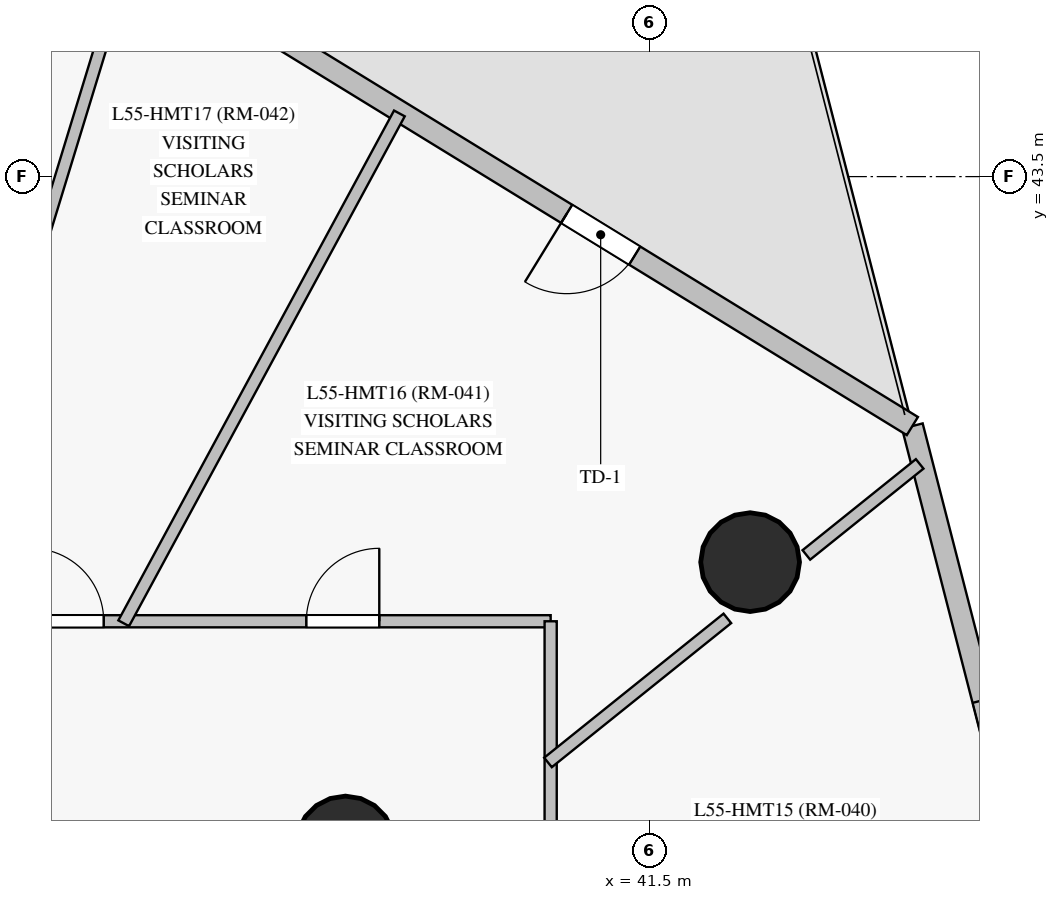
"""IFC4 building model, lengths in metres.
Left out: names, types, materials, properties, quantities, classifications, styles, units other than length and angle.
Written with IfcOpenShell. Run it as: python <this file> out.ifc"""

import sys

from ifc_helpers import new_model, si_unit, direction, frame, frame_2d, origin, origin_with_axes, origin_2d, place, context, subcontext, project, spatial, rectangle, circle, extrude, source, transform, mapped, element, fill, save


model = new_model("IFC4")
c1 = context("Model", 3, precision=1e-05, world=origin(), true_north=direction((0.0, 1.0)))
c2 = subcontext(c1, "Body", "Model", "MODEL_VIEW")
j1 = project(units=[si_unit("LENGTHUNIT", "METRE"), si_unit("PLANEANGLEUNIT", "RADIAN")], contexts=[c1])
p1 = place(None, origin())
s1 = spatial("IfcSite", under=j1, at=p1, CompositionType="ELEMENT")
p2 = place(p1, origin())
s2 = spatial("IfcBuilding", under=s1, at=p2, CompositionType="ELEMENT")
p3 = place(p2, frame((0.0, 0.0, 190.1)))
s3 = spatial("IfcBuildingStorey", under=s2, at=p3, CompositionType="ELEMENT", Elevation=190.1)
m1 = source(origin_with_axes(), c2, "Body", "SweptSolid", [
    extrude(circle(Radius=0.65, at=origin_2d()), origin(), (0.0, 0.0, 1.0), 3.05),
])
for number, where, z_axis, x_axis in (
    (1, (37.5, 34.7, 0.0), (0.0, 0.0, 1.0), (1.0, 0.0, 0.0)),
    (2, (42.824, 38.428, 0.0), (0.0, 0.0, 1.0), (1.0, 0.0, 0.0)),
):
    element("IfcColumn", number, at=place(p3, frame(where, z_axis=z_axis, x_axis=x_axis)), inside=s3, PredefinedType="COLUMN", context=c2, shape_type="MappedRepresentation", body=[
        mapped(m1, transform((0.0, 0.0, 0.0), scale=1.0)),
    ])
p4 = place(p3, frame((47.107, 31.861, 0.0), z_axis=(0.0, 0.0, 1.0), x_axis=(-0.249041039811, 0.968492932597, 0.0)))
e3 = element("IfcWall", 3, at=p4, inside=s3, PredefinedType="SOLIDWALL", context=c2, shape_type="SweptSolid", body=[
    extrude(rectangle(XDim=8.629, YDim=0.28, at=frame_2d((4.314, 0.0))), origin(), (0.0, 0.0, 1.0), 2.825),
])
p5 = place(p4, frame((3.154, 0.0, 0.85)))
e4 = element("IfcOpeningElement", 4, at=p5, cuts=e3, PredefinedType="OPENING", context=c2, shape_type="SweptSolid", body=[
    extrude(rectangle(XDim=1.75, YDim=1.65, at=frame_2d((0.875, 0.825))), frame((0.0, 0.15, 0.0), z_axis=(0.0, -1.0, 0.0), x_axis=(1.0, 0.0, 0.0)), (0.0, 0.0, 1.0), 0.3),
])
p6 = place(p3, frame((44.958, 40.218, 0.0), z_axis=(0.0, 0.0, 1.0), x_axis=(-0.852257947878, 0.523121773853, 0.0)))
e5 = element("IfcWall", 5, at=p6, inside=s3, PredefinedType="SOLIDWALL", context=c2, shape_type="SweptSolid", body=[
    extrude(rectangle(XDim=19.246, YDim=0.28, at=frame_2d((9.623, 0.0))), origin(), (0.0, 0.0, 1.0), 2.495),
])
p7 = place(p6, frame((4.287, 0.0, 0.0)))
e6 = element("IfcOpeningElement", 6, at=p7, cuts=e5, PredefinedType="OPENING", context=c2, shape_type="SweptSolid", body=[
    extrude(rectangle(XDim=1.05, YDim=2.12, at=frame_2d((0.525, 1.06))), frame((0.0, 0.15, 0.0), z_axis=(0.0, -1.0, 0.0), x_axis=(1.0, 0.0, 0.0)), (0.0, 0.0, 1.0), 0.3),
])
p8 = place(p3, frame((16.7, 37.65, 0.0), z_axis=(0.0, 0.0, 1.0), x_axis=(1.0, 0.0, 0.0)))
e7 = element("IfcWall", 7, at=p8, inside=s3, PredefinedType="PARTITIONING", context=c2, shape_type="SweptSolid", body=[
    extrude(rectangle(XDim=23.5, YDim=0.16, at=frame_2d((11.75, 0.0))), origin(), (0.0, 0.0, 1.0), 2.375),
])
p9 = place(p8, frame((20.285, 0.0, 0.0)))
e8 = element("IfcOpeningElement", 8, at=p9, cuts=e7, PredefinedType="OPENING", context=c2, shape_type="SweptSolid", body=[
    extrude(rectangle(XDim=0.96, YDim=2.15, at=frame_2d((0.48, 1.075))), frame((0.0, 0.09, 0.0), z_axis=(0.0, -1.0, 0.0), x_axis=(1.0, 0.0, 0.0)), (0.0, 0.0, 1.0), 0.18),
])
p10 = place(p8, frame((16.66, 0.0, 0.0)))
e9 = element("IfcOpeningElement", 9, at=p10, cuts=e7, PredefinedType="OPENING", context=c2, shape_type="SweptSolid", body=[
    extrude(rectangle(XDim=0.96, YDim=2.15, at=frame_2d((0.48, 1.075))), frame((0.0, 0.09, 0.0), z_axis=(0.0, -1.0, 0.0), x_axis=(1.0, 0.0, 0.0)), (0.0, 0.0, 1.0), 0.18),
])
p11 = place(p8, frame((13.863, 0.0, 0.0)))
e10 = element("IfcOpeningElement", 10, at=p11, cuts=e7, PredefinedType="OPENING", context=c2, shape_type="SweptSolid", body=[
    extrude(rectangle(XDim=0.96, YDim=2.15, at=frame_2d((0.48, 1.075))), frame((0.0, 0.09, 0.0), z_axis=(0.0, -1.0, 0.0), x_axis=(1.0, 0.0, 0.0)), (0.0, 0.0, 1.0), 0.18),
])
p12 = place(p8, frame((11.965, 0.0, 0.0)))
e11 = element("IfcOpeningElement", 11, at=p12, cuts=e7, PredefinedType="OPENING", context=c2, shape_type="SweptSolid", body=[
    extrude(rectangle(XDim=0.96, YDim=2.15, at=frame_2d((0.48, 1.075))), frame((0.0, 0.09, 0.0), z_axis=(0.0, -1.0, 0.0), x_axis=(1.0, 0.0, 0.0)), (0.0, 0.0, 1.0), 0.18),
])
p13 = place(p8, frame((10.215, 0.0, 0.0)))
e12 = element("IfcOpeningElement", 12, at=p13, cuts=e7, PredefinedType="OPENING", context=c2, shape_type="SweptSolid", body=[
    extrude(rectangle(XDim=0.96, YDim=2.15, at=frame_2d((0.48, 1.075))), frame((0.0, 0.09, 0.0), z_axis=(0.0, -1.0, 0.0), x_axis=(1.0, 0.0, 0.0)), (0.0, 0.0, 1.0), 0.18),
])
p14 = place(p8, frame((8.14, 0.0, 0.0)))
e13 = element("IfcOpeningElement", 13, at=p14, cuts=e7, PredefinedType="OPENING", context=c2, shape_type="SweptSolid", body=[
    extrude(rectangle(XDim=0.96, YDim=2.15, at=frame_2d((0.48, 1.075))), frame((0.0, 0.09, 0.0), z_axis=(0.0, -1.0, 0.0), x_axis=(1.0, 0.0, 0.0)), (0.0, 0.0, 1.0), 0.18),
])
p15 = place(p8, frame((5.54, 0.0, 0.0)))
e14 = element("IfcOpeningElement", 14, at=p15, cuts=e7, PredefinedType="OPENING", context=c2, shape_type="SweptSolid", body=[
    extrude(rectangle(XDim=0.96, YDim=2.15, at=frame_2d((0.48, 1.075))), frame((0.0, 0.09, 0.0), z_axis=(0.0, -1.0, 0.0), x_axis=(1.0, 0.0, 0.0)), (0.0, 0.0, 1.0), 0.18),
])
p16 = place(p8, frame((3.377, 0.0, 0.0)))
e15 = element("IfcOpeningElement", 15, at=p16, cuts=e7, PredefinedType="OPENING", context=c2, shape_type="SweptSolid", body=[
    extrude(rectangle(XDim=0.96, YDim=2.15, at=frame_2d((0.48, 1.075))), frame((0.0, 0.09, 0.0), z_axis=(0.0, -1.0, 0.0), x_axis=(1.0, 0.0, 0.0)), (0.0, 0.0, 1.0), 0.18),
])
p17 = place(p3, frame((40.2, 37.65, 0.0), z_axis=(0.0, 0.0, 1.0), x_axis=(0.0, -1.0, 0.0)))
e16 = element("IfcWall", 16, at=p17, inside=s3, PredefinedType="PARTITIONING", context=c2, shape_type="SweptSolid", body=[
    extrude(rectangle(XDim=22.3, YDim=0.16, at=frame_2d((11.15, 0.0))), origin(), (0.0, 0.0, 1.0), 2.375),
])
p18 = place(p17, frame((19.455, 0.0, 0.0)))
e17 = element("IfcOpeningElement", 17, at=p18, cuts=e16, PredefinedType="OPENING", context=c2, shape_type="SweptSolid", body=[
    extrude(rectangle(XDim=0.96, YDim=2.15, at=frame_2d((0.48, 1.075))), frame((0.0, 0.09, 0.0), z_axis=(0.0, -1.0, 0.0), x_axis=(1.0, 0.0, 0.0)), (0.0, 0.0, 1.0), 0.18),
])
p19 = place(p17, frame((11.265, 0.0, 0.0)))
e18 = element("IfcOpeningElement", 18, at=p19, cuts=e16, PredefinedType="OPENING", context=c2, shape_type="SweptSolid", body=[
    extrude(rectangle(XDim=0.96, YDim=2.15, at=frame_2d((0.48, 1.075))), frame((0.0, 0.09, 0.0), z_axis=(0.0, -1.0, 0.0), x_axis=(1.0, 0.0, 0.0)), (0.0, 0.0, 1.0), 0.18),
])
p20 = place(p17, frame((7.33, 0.0, 0.0)))
e19 = element("IfcOpeningElement", 19, at=p20, cuts=e16, PredefinedType="OPENING", context=c2, shape_type="SweptSolid", body=[
    extrude(rectangle(XDim=0.96, YDim=2.15, at=frame_2d((0.48, 1.075))), frame((0.0, 0.09, 0.0), z_axis=(0.0, -1.0, 0.0), x_axis=(1.0, 0.0, 0.0)), (0.0, 0.0, 1.0), 0.18),
])
p21 = place(p17, frame((5.1, 0.0, 0.0)))
e20 = element("IfcOpeningElement", 20, at=p21, cuts=e16, PredefinedType="OPENING", context=c2, shape_type="SweptSolid", body=[
    extrude(rectangle(XDim=0.96, YDim=2.15, at=frame_2d((0.48, 1.075))), frame((0.0, 0.09, 0.0), z_axis=(0.0, -1.0, 0.0), x_axis=(1.0, 0.0, 0.0)), (0.0, 0.0, 1.0), 0.18),
])
p22 = place(p3, frame((31.963, 37.621, 0.0), z_axis=(0.0, 0.0, 1.0), x_axis=(0.292360870747, 0.956308068175, 0.0)))
e21 = element("IfcWall", 21, at=p22, inside=s3, PredefinedType="PARTITIONING", context=c2, shape_type="SweptSolid", body=[
    extrude(rectangle(XDim=9.282, YDim=0.16, at=frame_2d((4.641, 0.0))), origin(), (0.0, 0.0, 1.0), 2.825),
])
p23 = place(p3, frame((34.583, 37.624, 0.0), z_axis=(0.0, 0.0, 1.0), x_axis=(0.47560743502, 0.879657642355, 0.0)))
e22 = element("IfcWall", 22, at=p23, inside=s3, PredefinedType="PARTITIONING", context=c2, shape_type="SweptSolid", body=[
    extrude(rectangle(XDim=7.625, YDim=0.16, at=frame_2d((3.813, 0.0))), origin(), (0.0, 0.0, 1.0), 2.825),
])
p24 = place(p3, frame((40.165, 35.792, 0.0), z_axis=(0.0, 0.0, 1.0), x_axis=(0.77963972714, 0.626228309696, 0.0)))
e23 = element("IfcWall", 23, at=p24, inside=s3, PredefinedType="PARTITIONING", context=c2, shape_type="SweptSolid", body=[
    extrude(rectangle(XDim=3.027, YDim=0.16, at=frame_2d((1.513, 0.0))), origin(), (0.0, 0.0, 1.0), 2.275),
])
p25 = place(p3, frame((43.564, 38.523, 0.0), z_axis=(0.0, 0.0, 1.0), x_axis=(0.779659188249, 0.626204080295, 0.0)))
e24 = element("IfcWall", 24, at=p25, inside=s3, PredefinedType="PARTITIONING", context=c2, shape_type="SweptSolid", body=[
    extrude(rectangle(XDim=1.912, YDim=0.16, at=frame_2d((0.956, 0.0))), origin(), (0.0, 0.0, 1.0), 2.495),
])
m2 = source(origin_with_axes(), c2, "Body", "SweptSolid", [
    extrude(rectangle(XDim=1.05, YDim=2.12, at=frame_2d((0.525, 1.06))), frame((0.0, 0.025, 0.0), z_axis=(0.0, -1.0, 0.0), x_axis=(1.0, 0.0, 0.0)), (0.0, 0.0, 1.0), 0.05),
])
p26 = place(p7, origin())
e25 = element("IfcDoor", 25, at=p26, inside=s3, OperationType="SINGLE_SWING_RIGHT", PredefinedType="DOOR", context=c2, shape_type="MappedRepresentation", body=[
    mapped(m2, transform((0.0, 0.0, 0.0), scale=1.0)),
])
fill(e6, e25)
m3 = source(origin_with_axes(), c2, "Body", "SweptSolid", [
    extrude(rectangle(XDim=0.96, YDim=2.15, at=frame_2d((0.48, 1.075))), frame((0.0, 0.025, 0.0), z_axis=(0.0, -1.0, 0.0), x_axis=(1.0, 0.0, 0.0)), (0.0, 0.0, 1.0), 0.05),
])
p27 = place(p9, origin())
e26 = element("IfcDoor", 26, at=p27, inside=s3, OperationType="SINGLE_SWING_RIGHT", PredefinedType="DOOR", context=c2, shape_type="MappedRepresentation", body=[
    mapped(m3, transform((0.0, 0.0, 0.0), scale=1.0)),
])
fill(e8, e26)
p28 = place(p10, origin())
e27 = element("IfcDoor", 27, at=p28, inside=s3, OperationType="SINGLE_SWING_LEFT", PredefinedType="DOOR", context=c2, shape_type="MappedRepresentation", body=[
    mapped(m3, transform((0.0, 0.0, 0.0), scale=1.0)),
])
fill(e9, e27)
save(model, sys.argv[1])
